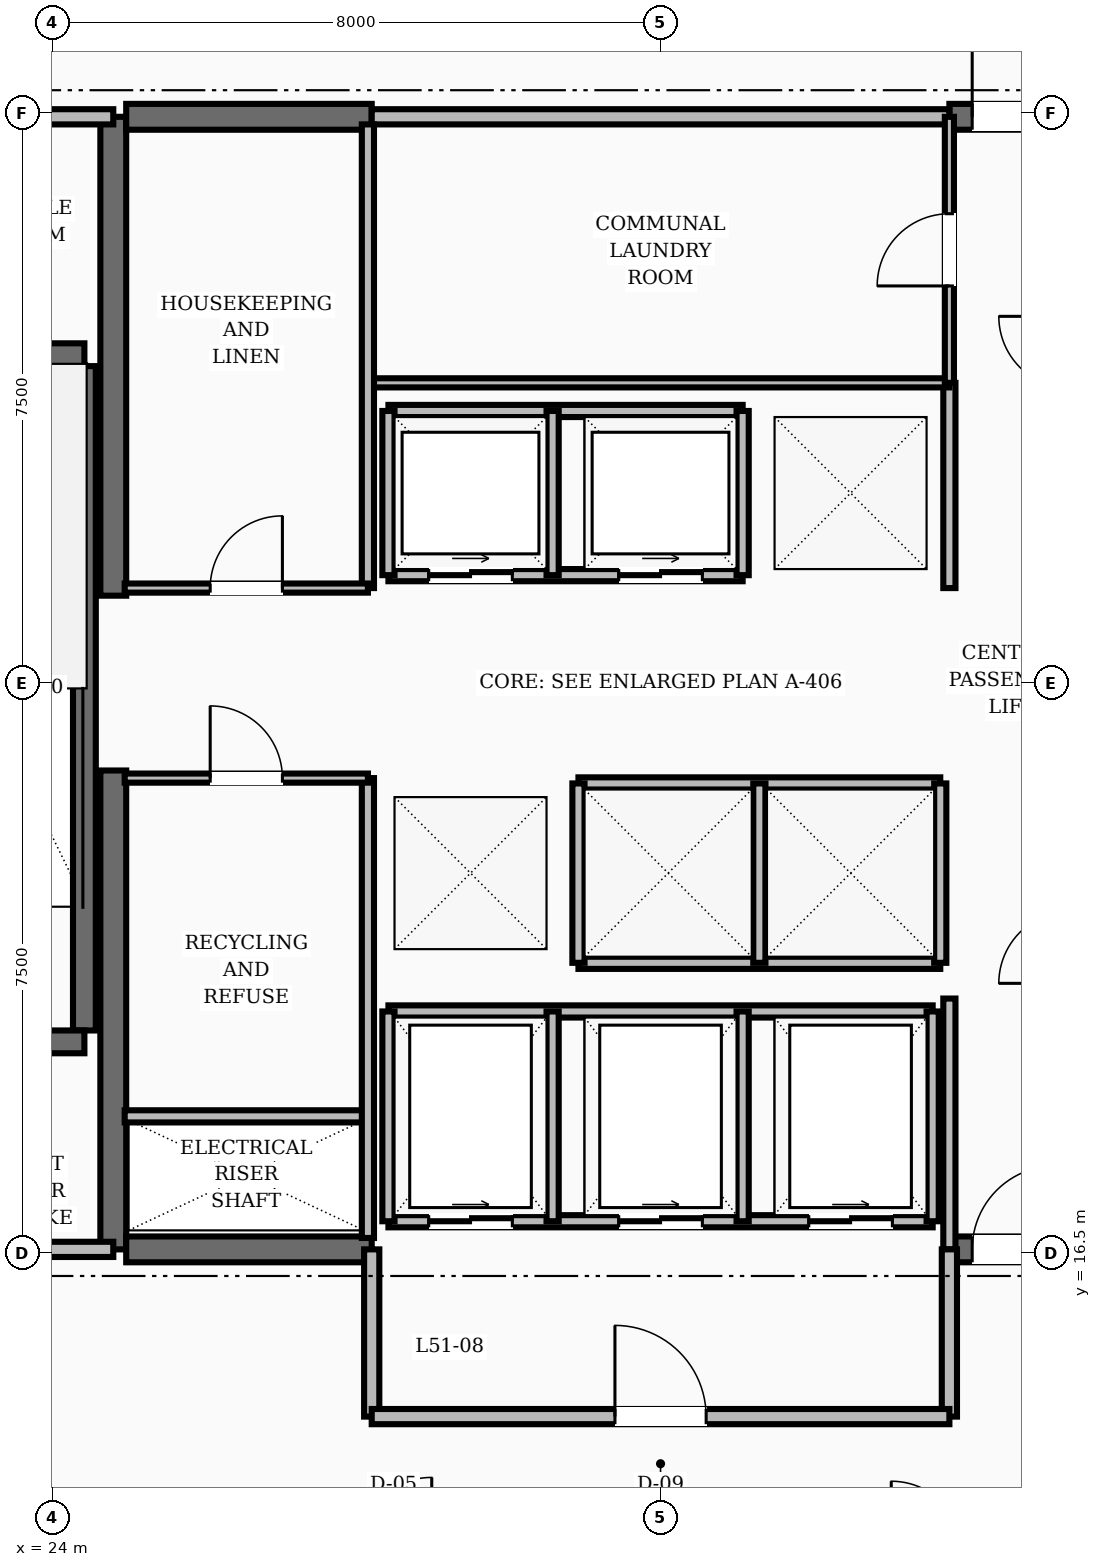
"""IFC4 building model, lengths in metres.
Left out: names, types, materials, properties, quantities, classifications, styles, units other than length and angle.
Written with IfcOpenShell. Run it as: python <this file> out.ifc"""

import sys

from ifc_helpers import new_model, si_unit, direction, frame, frame_2d, origin, place, context, subcontext, project, spatial, rectangle, extrude, element, fill, save


model = new_model("IFC4")
c1 = context("Model", 3, precision=1e-05, world=origin(), true_north=direction((0.0, 1.0)))
c2 = subcontext(c1, "Body", "Model", "MODEL_VIEW")
j1 = project(units=[si_unit("LENGTHUNIT", "METRE"), si_unit("PLANEANGLEUNIT", "RADIAN")], contexts=[c1])
p1 = place(None, origin())
s1 = spatial("IfcSite", under=j1, at=p1, CompositionType="ELEMENT")
p2 = place(p1, origin())
s2 = spatial("IfcBuilding", under=s1, at=p2, CompositionType="ELEMENT")
p3 = place(p2, frame((0.0, 0.0, 196.4)))
s3 = spatial("IfcBuildingStorey", under=s2, at=p3, CompositionType="ELEMENT", Elevation=196.4)
for number, where, z_axis, x_axis in (
    (1, (24.8, 16.55, 0.0), (0.0, 0.0, 1.0), (0.0, 1.0, 0.0)),
    (2, (24.8, 25.15, 0.0), (0.0, 0.0, 1.0), (0.0, 1.0, 0.0)),
):
    element("IfcWall", number, at=place(p3, frame(where, z_axis=z_axis, x_axis=x_axis)), inside=s3, PredefinedType="SHEAR", context=c2, shape_type="SweptSolid", body=[
        extrude(rectangle(XDim=6.3, YDim=0.34, at=frame_2d((3.15, 0.0))), origin(), (0.0, 0.0, 1.0), 3.6),
    ])
p4 = place(p3, frame((24.97, 16.55, 0.0), z_axis=(0.0, 0.0, 1.0), x_axis=(1.0, 0.0, 0.0)))
e3 = element("IfcWall", 3, at=p4, inside=s3, PredefinedType="SHEAR", context=c2, shape_type="SweptSolid", body=[
    extrude(rectangle(XDim=3.23, YDim=0.34, at=frame_2d((1.615, 0.0))), origin(), (0.0, 0.0, 1.0), 3.6),
])
p5 = place(p3, frame((35.8, 16.55, 0.0), z_axis=(0.0, 0.0, 1.0), x_axis=(1.0, 0.0, 0.0)))
e4 = element("IfcWall", 4, at=p5, inside=s3, PredefinedType="SHEAR", context=c2, shape_type="SweptSolid", body=[
    extrude(rectangle(XDim=3.23, YDim=0.34, at=frame_2d((1.615, 0.0))), origin(), (0.0, 0.0, 1.0), 3.6),
])
p6 = place(p5, frame((0.3, 0.0, 0.0)))
e5 = element("IfcOpeningElement", 5, at=p6, cuts=e4, PredefinedType="OPENING", context=c2, shape_type="SweptSolid", body=[
    extrude(rectangle(XDim=1.1, YDim=2.1, at=frame_2d((0.55, 1.05))), frame((0.0, 0.18, 0.0), z_axis=(0.0, -1.0, 0.0), x_axis=(1.0, 0.0, 0.0)), (0.0, 0.0, 1.0), 0.36),
])
p7 = place(p3, frame((24.97, 31.45, 0.0), z_axis=(0.0, 0.0, 1.0), x_axis=(1.0, 0.0, 0.0)))
e6 = element("IfcWall", 6, at=p7, inside=s3, PredefinedType="SHEAR", context=c2, shape_type="SweptSolid", body=[
    extrude(rectangle(XDim=3.23, YDim=0.34, at=frame_2d((1.615, 0.0))), origin(), (0.0, 0.0, 1.0), 3.6),
])
p8 = place(p3, frame((35.8, 31.45, 0.0), z_axis=(0.0, 0.0, 1.0), x_axis=(1.0, 0.0, 0.0)))
e7 = element("IfcWall", 7, at=p8, inside=s3, PredefinedType="SHEAR", context=c2, shape_type="SweptSolid", body=[
    extrude(rectangle(XDim=3.23, YDim=0.34, at=frame_2d((1.615, 0.0))), origin(), (0.0, 0.0, 1.0), 3.6),
])
p9 = place(p8, frame((0.3, 0.0, 0.0)))
e8 = element("IfcOpeningElement", 8, at=p9, cuts=e7, PredefinedType="OPENING", context=c2, shape_type="SweptSolid", body=[
    extrude(rectangle(XDim=1.1, YDim=2.1, at=frame_2d((0.55, 1.05))), frame((0.0, 0.18, 0.0), z_axis=(0.0, -1.0, 0.0), x_axis=(1.0, 0.0, 0.0)), (0.0, 0.0, 1.0), 0.36),
])
p10 = place(p3, frame((24.42, 19.43, 0.0), z_axis=(0.0, 0.0, 1.0), x_axis=(0.0, 1.0, 0.0)))
e9 = element("IfcWall", 9, at=p10, inside=s3, PredefinedType="SHEAR", context=c2, shape_type="SweptSolid", body=[
    extrude(rectangle(XDim=8.74, YDim=0.3, at=frame_2d((4.37, 0.0))), origin(), (0.0, 0.0, 1.0), 3.6),
])
p11 = place(p3, frame((20.82, 19.28, 0.0), z_axis=(0.0, 0.0, 1.0), x_axis=(1.0, 0.0, 0.0)))
e10 = element("IfcWall", 10, at=p11, inside=s3, PredefinedType="SHEAR", context=c2, shape_type="SweptSolid", body=[
    extrude(rectangle(XDim=3.6, YDim=0.3, at=frame_2d((1.8, 0.0))), origin(), (0.0, 0.0, 1.0), 3.6),
])
p12 = place(p11, frame((1.3, 0.0, 0.0)))
e11 = element("IfcOpeningElement", 11, at=p12, cuts=e10, PredefinedType="OPENING", context=c2, shape_type="SweptSolid", body=[
    extrude(rectangle(XDim=1.1, YDim=2.1, at=frame_2d((0.55, 1.05))), frame((0.0, 0.16, 0.0), z_axis=(0.0, -1.0, 0.0), x_axis=(1.0, 0.0, 0.0)), (0.0, 0.0, 1.0), 0.32),
])
p13 = place(p3, frame((20.82, 28.32, 0.0), z_axis=(0.0, 0.0, 1.0), x_axis=(1.0, 0.0, 0.0)))
e12 = element("IfcWall", 12, at=p13, inside=s3, PredefinedType="SHEAR", context=c2, shape_type="SweptSolid", body=[
    extrude(rectangle(XDim=3.6, YDim=0.3, at=frame_2d((1.8, 0.0))), origin(), (0.0, 0.0, 1.0), 3.6),
])
for number, where, z_axis, x_axis in (
    (13, (20.82, 16.55, 0.0), (0.0, 0.0, 1.0), (1.0, 0.0, 0.0)),
    (14, (20.82, 31.45, 0.0), (0.0, 0.0, 1.0), (1.0, 0.0, 0.0)),
):
    element("IfcWall", number, at=place(p3, frame(where, z_axis=z_axis, x_axis=x_axis)), inside=s3, PredefinedType="SOLIDWALL", context=c2, shape_type="SweptSolid", body=[
        extrude(rectangle(XDim=3.98, YDim=0.2, at=frame_2d((1.99, 0.0))), origin(), (0.0, 0.0, 1.0), 2.8),
    ])
p14 = place(p3, frame((35.8, 16.55, 0.0), z_axis=(0.0, 0.0, 1.0), x_axis=(0.0, 1.0, 0.0)))
e15 = element("IfcWall", 15, at=p14, inside=s3, PredefinedType="SOLIDWALL", context=c2, shape_type="SweptSolid", body=[
    extrude(rectangle(XDim=3.3, YDim=0.16, at=frame_2d((1.65, 0.0))), origin(), (0.0, 0.0, 1.0), 2.8),
])
p15 = place(p3, frame((35.8, 25.25, 0.0), z_axis=(0.0, 0.0, 1.0), x_axis=(0.0, 1.0, 0.0)))
e16 = element("IfcWall", 16, at=p15, inside=s3, PredefinedType="SOLIDWALL", context=c2, shape_type="SweptSolid", body=[
    extrude(rectangle(XDim=2.7, YDim=0.16, at=frame_2d((1.35, 0.0))), origin(), (0.0, 0.0, 1.0), 2.8),
])
for number, where, z_axis, x_axis in (
    (17, (28.2, 14.35, 0.0), (0.0, 0.0, 1.0), (0.0, 1.0, 0.0)),
    (18, (35.8, 14.35, 0.0), (0.0, 0.0, 1.0), (0.0, 1.0, 0.0)),
):
    element("IfcWall", number, at=place(p3, frame(where, z_axis=z_axis, x_axis=x_axis)), inside=s3, PredefinedType="SOLIDWALL", context=c2, shape_type="SweptSolid", body=[
        extrude(rectangle(XDim=2.2, YDim=0.2, at=frame_2d((1.1, 0.0))), origin(), (0.0, 0.0, 1.0), 2.8),
    ])
p16 = place(p3, frame((28.2, 14.35, 0.0), z_axis=(0.0, 0.0, 1.0), x_axis=(1.0, 0.0, 0.0)))
e19 = element("IfcWall", 19, at=p16, inside=s3, PredefinedType="SOLIDWALL", context=c2, shape_type="SweptSolid", body=[
    extrude(rectangle(XDim=7.6, YDim=0.2, at=frame_2d((3.8, 0.0))), origin(), (0.0, 0.0, 1.0), 2.8),
])
p17 = place(p16, frame((3.2, 0.0, 0.0)))
e20 = element("IfcOpeningElement", 20, at=p17, cuts=e19, PredefinedType="OPENING", context=c2, shape_type="SweptSolid", body=[
    extrude(rectangle(XDim=1.2, YDim=2.1, at=frame_2d((0.6, 1.05))), frame((0.0, 0.11, 0.0), z_axis=(0.0, -1.0, 0.0), x_axis=(1.0, 0.0, 0.0)), (0.0, 0.0, 1.0), 0.22),
])
p18 = place(p3, frame((28.42, 25.42, 0.0), z_axis=(0.0, 0.0, 1.0), x_axis=(1.0, 0.0, 0.0)))
e21 = element("IfcWall", 21, at=p18, inside=s3, PredefinedType="SOLIDWALL", context=c2, shape_type="SweptSolid", body=[
    extrude(rectangle(XDim=4.66, YDim=0.16, at=frame_2d((2.33, 0.0))), origin(), (0.0, 0.0, 1.0), 2.8),
])
p19 = place(p18, frame((0.53, 0.0, 0.0)))
e22 = element("IfcOpeningElement", 22, at=p19, cuts=e21, PredefinedType="OPENING", context=c2, shape_type="SweptSolid", body=[
    extrude(rectangle(XDim=1.1, YDim=2.15, at=frame_2d((0.55, 1.075))), frame((0.0, 0.09, 0.0), z_axis=(0.0, -1.0, 0.0), x_axis=(1.0, 0.0, 0.0)), (0.0, 0.0, 1.0), 0.18),
])
p20 = place(p18, frame((3.03, 0.0, 0.0)))
e23 = element("IfcOpeningElement", 23, at=p20, cuts=e21, PredefinedType="OPENING", context=c2, shape_type="SweptSolid", body=[
    extrude(rectangle(XDim=1.1, YDim=2.15, at=frame_2d((0.55, 1.075))), frame((0.0, 0.09, 0.0), z_axis=(0.0, -1.0, 0.0), x_axis=(1.0, 0.0, 0.0)), (0.0, 0.0, 1.0), 0.18),
])
p21 = place(p3, frame((28.42, 27.58, 0.0), z_axis=(0.0, 0.0, 1.0), x_axis=(1.0, 0.0, 0.0)))
e24 = element("IfcWall", 24, at=p21, inside=s3, PredefinedType="SOLIDWALL", context=c2, shape_type="SweptSolid", body=[
    extrude(rectangle(XDim=4.66, YDim=0.16, at=frame_2d((2.33, 0.0))), origin(), (0.0, 0.0, 1.0), 2.8),
])
for number, where, z_axis, x_axis in (
    (25, (28.42, 25.42, 0.0), (0.0, 0.0, 1.0), (0.0, 1.0, 0.0)),
    (26, (30.58, 25.42, 0.0), (0.0, 0.0, 1.0), (0.0, 1.0, 0.0)),
    (27, (33.08, 25.42, 0.0), (0.0, 0.0, 1.0), (0.0, 1.0, 0.0)),
):
    element("IfcWall", number, at=place(p3, frame(where, z_axis=z_axis, x_axis=x_axis)), inside=s3, PredefinedType="SOLIDWALL", context=c2, shape_type="SweptSolid", body=[
        extrude(rectangle(XDim=2.16, YDim=0.16, at=frame_2d((1.08, 0.0))), origin(), (0.0, 0.0, 1.0), 2.8),
    ])
for number, where, z_axis, x_axis in (
    (28, (30.92, 22.68, 0.0), (0.0, 0.0, 1.0), (1.0, 0.0, 0.0)),
    (29, (30.92, 20.32, 0.0), (0.0, 0.0, 1.0), (1.0, 0.0, 0.0)),
):
    element("IfcWall", number, at=place(p3, frame(where, z_axis=z_axis, x_axis=x_axis)), inside=s3, PredefinedType="SOLIDWALL", context=c2, shape_type="SweptSolid", body=[
        extrude(rectangle(XDim=4.76, YDim=0.16, at=frame_2d((2.38, 0.0))), origin(), (0.0, 0.0, 1.0), 2.8),
    ])
for number, where, z_axis, x_axis in (
    (30, (30.92, 20.32, 0.0), (0.0, 0.0, 1.0), (0.0, 1.0, 0.0)),
    (31, (33.3, 20.32, 0.0), (0.0, 0.0, 1.0), (0.0, 1.0, 0.0)),
    (32, (35.68, 20.32, 0.0), (0.0, 0.0, 1.0), (0.0, 1.0, 0.0)),
):
    element("IfcWall", number, at=place(p3, frame(where, z_axis=z_axis, x_axis=x_axis)), inside=s3, PredefinedType="SOLIDWALL", context=c2, shape_type="SweptSolid", body=[
        extrude(rectangle(XDim=2.36, YDim=0.16, at=frame_2d((1.18, 0.0))), origin(), (0.0, 0.0, 1.0), 2.8),
    ])
p22 = place(p3, frame((28.42, 16.92, 0.0), z_axis=(0.0, 0.0, 1.0), x_axis=(1.0, 0.0, 0.0)))
e33 = element("IfcWall", 33, at=p22, inside=s3, PredefinedType="SOLIDWALL", context=c2, shape_type="SweptSolid", body=[
    extrude(rectangle(XDim=7.16, YDim=0.16, at=frame_2d((3.58, 0.0))), origin(), (0.0, 0.0, 1.0), 2.8),
])
p23 = place(p22, frame((0.53, 0.0, 0.0)))
e34 = element("IfcOpeningElement", 34, at=p23, cuts=e33, PredefinedType="OPENING", context=c2, shape_type="SweptSolid", body=[
    extrude(rectangle(XDim=1.1, YDim=2.15, at=frame_2d((0.55, 1.075))), frame((0.0, 0.09, 0.0), z_axis=(0.0, -1.0, 0.0), x_axis=(1.0, 0.0, 0.0)), (0.0, 0.0, 1.0), 0.18),
])
p24 = place(p22, frame((3.03, 0.0, 0.0)))
e35 = element("IfcOpeningElement", 35, at=p24, cuts=e33, PredefinedType="OPENING", context=c2, shape_type="SweptSolid", body=[
    extrude(rectangle(XDim=1.1, YDim=2.15, at=frame_2d((0.55, 1.075))), frame((0.0, 0.09, 0.0), z_axis=(0.0, -1.0, 0.0), x_axis=(1.0, 0.0, 0.0)), (0.0, 0.0, 1.0), 0.18),
])
p25 = place(p22, frame((5.53, 0.0, 0.0)))
e36 = element("IfcOpeningElement", 36, at=p25, cuts=e33, PredefinedType="OPENING", context=c2, shape_type="SweptSolid", body=[
    extrude(rectangle(XDim=1.1, YDim=2.15, at=frame_2d((0.55, 1.075))), frame((0.0, 0.09, 0.0), z_axis=(0.0, -1.0, 0.0), x_axis=(1.0, 0.0, 0.0)), (0.0, 0.0, 1.0), 0.18),
])
p26 = place(p3, frame((28.42, 19.68, 0.0), z_axis=(0.0, 0.0, 1.0), x_axis=(1.0, 0.0, 0.0)))
e37 = element("IfcWall", 37, at=p26, inside=s3, PredefinedType="SOLIDWALL", context=c2, shape_type="SweptSolid", body=[
    extrude(rectangle(XDim=7.16, YDim=0.16, at=frame_2d((3.58, 0.0))), origin(), (0.0, 0.0, 1.0), 2.8),
])
for number, where, z_axis, x_axis in (
    (38, (28.42, 16.92, 0.0), (0.0, 0.0, 1.0), (0.0, 1.0, 0.0)),
    (39, (30.58, 16.92, 0.0), (0.0, 0.0, 1.0), (0.0, 1.0, 0.0)),
    (40, (33.08, 16.92, 0.0), (0.0, 0.0, 1.0), (0.0, 1.0, 0.0)),
    (41, (35.58, 16.92, 0.0), (0.0, 0.0, 1.0), (0.0, 1.0, 0.0)),
):
    element("IfcWall", number, at=place(p3, frame(where, z_axis=z_axis, x_axis=x_axis)), inside=s3, PredefinedType="SOLIDWALL", context=c2, shape_type="SweptSolid", body=[
        extrude(rectangle(XDim=2.76, YDim=0.16, at=frame_2d((1.38, 0.0))), origin(), (0.0, 0.0, 1.0), 2.8),
    ])
p27 = place(p3, frame((28.2, 31.45, 0.0), z_axis=(0.0, 0.0, 1.0), x_axis=(1.0, 0.0, 0.0)))
e42 = element("IfcWall", 42, at=p27, inside=s3, PredefinedType="SOLIDWALL", context=c2, shape_type="SweptSolid", body=[
    extrude(rectangle(XDim=7.6, YDim=0.2, at=frame_2d((3.8, 0.0))), origin(), (0.0, 0.0, 1.0), 2.8),
])
p28 = place(p3, frame((28.2, 27.95, 0.0), z_axis=(0.0, 0.0, 1.0), x_axis=(1.0, 0.0, 0.0)))
e43 = element("IfcWall", 43, at=p28, inside=s3, PredefinedType="PARTITIONING", context=c2, shape_type="SweptSolid", body=[
    extrude(rectangle(XDim=7.6, YDim=0.12, at=frame_2d((3.8, 0.0))), origin(), (0.0, 0.0, 1.0), 2.8),
])
p29 = place(p3, frame((35.8, 27.95, 0.0), z_axis=(0.0, 0.0, 1.0), x_axis=(0.0, 1.0, 0.0)))
e44 = element("IfcWall", 44, at=p29, inside=s3, PredefinedType="PARTITIONING", context=c2, shape_type="SweptSolid", body=[
    extrude(rectangle(XDim=3.5, YDim=0.12, at=frame_2d((1.75, 0.0))), origin(), (0.0, 0.0, 1.0), 2.8),
])
p30 = place(p29, frame((1.275, 0.0, 0.0)))
e45 = element("IfcOpeningElement", 45, at=p30, cuts=e44, PredefinedType="OPENING", context=c2, shape_type="SweptSolid", body=[
    extrude(rectangle(XDim=0.95, YDim=2.1, at=frame_2d((0.475, 1.05))), frame((0.0, 0.07, 0.0), z_axis=(0.0, -1.0, 0.0), x_axis=(1.0, 0.0, 0.0)), (0.0, 0.0, 1.0), 0.14),
])
p31 = place(p3, frame((24.95, 18.3, 0.0), z_axis=(0.0, 0.0, 1.0), x_axis=(1.0, 0.0, 0.0)))
e46 = element("IfcWall", 46, at=p31, inside=s3, PredefinedType="SOLIDWALL", context=c2, shape_type="SweptSolid", body=[
    extrude(rectangle(XDim=3.2, YDim=0.16, at=frame_2d((1.6, 0.0))), origin(), (0.0, 0.0, 1.0), 2.8),
])
p32 = place(p3, frame((28.15, 16.7, 0.0), z_axis=(0.0, 0.0, 1.0), x_axis=(0.0, 1.0, 0.0)))
e47 = element("IfcWall", 47, at=p32, inside=s3, PredefinedType="SOLIDWALL", context=c2, shape_type="SweptSolid", body=[
    extrude(rectangle(XDim=6.05, YDim=0.16, at=frame_2d((3.025, 0.0))), origin(), (0.0, 0.0, 1.0), 2.8),
])
p33 = place(p3, frame((28.15, 25.25, 0.0), z_axis=(0.0, 0.0, 1.0), x_axis=(0.0, 1.0, 0.0)))
e48 = element("IfcWall", 48, at=p33, inside=s3, PredefinedType="SOLIDWALL", context=c2, shape_type="SweptSolid", body=[
    extrude(rectangle(XDim=6.1, YDim=0.16, at=frame_2d((3.05, 0.0))), origin(), (0.0, 0.0, 1.0), 2.8),
])
p34 = place(p3, frame((24.95, 25.25, 0.0), z_axis=(0.0, 0.0, 1.0), x_axis=(1.0, 0.0, 0.0)))
e49 = element("IfcWall", 49, at=p34, inside=s3, PredefinedType="PARTITIONING", context=c2, shape_type="SweptSolid", body=[
    extrude(rectangle(XDim=3.2, YDim=0.12, at=frame_2d((1.6, 0.0))), origin(), (0.0, 0.0, 1.0), 2.8),
])
p35 = place(p34, frame((1.125, 0.0, 0.0)))
e50 = element("IfcOpeningElement", 50, at=p35, cuts=e49, PredefinedType="OPENING", context=c2, shape_type="SweptSolid", body=[
    extrude(rectangle(XDim=0.95, YDim=2.1, at=frame_2d((0.475, 1.05))), frame((0.0, 0.07, 0.0), z_axis=(0.0, -1.0, 0.0), x_axis=(1.0, 0.0, 0.0)), (0.0, 0.0, 1.0), 0.14),
])
p36 = place(p3, frame((24.95, 22.75, 0.0), z_axis=(0.0, 0.0, 1.0), x_axis=(1.0, 0.0, 0.0)))
e51 = element("IfcWall", 51, at=p36, inside=s3, PredefinedType="PARTITIONING", context=c2, shape_type="SweptSolid", body=[
    extrude(rectangle(XDim=3.2, YDim=0.12, at=frame_2d((1.6, 0.0))), origin(), (0.0, 0.0, 1.0), 2.8),
])
p37 = place(p36, frame((1.125, 0.0, 0.0)))
e52 = element("IfcOpeningElement", 52, at=p37, cuts=e51, PredefinedType="OPENING", context=c2, shape_type="SweptSolid", body=[
    extrude(rectangle(XDim=0.95, YDim=2.1, at=frame_2d((0.475, 1.05))), frame((0.0, 0.07, 0.0), z_axis=(0.0, -1.0, 0.0), x_axis=(1.0, 0.0, 0.0)), (0.0, 0.0, 1.0), 0.14),
])
p38 = place(p9, origin())
e53 = element("IfcDoor", 53, at=p38, inside=s3, OperationType="SINGLE_SWING_LEFT", PredefinedType="DOOR", context=c2, shape_type="SweptSolid", body=[
    extrude(rectangle(XDim=1.1, YDim=2.1, at=frame_2d((0.55, 1.05))), frame((0.0, 0.025, 0.0), z_axis=(0.0, -1.0, 0.0), x_axis=(1.0, 0.0, 0.0)), (0.0, 0.0, 1.0), 0.05),
])
fill(e8, e53)
p39 = place(p6, origin())
e54 = element("IfcDoor", 54, at=p39, inside=s3, OperationType="SINGLE_SWING_RIGHT", PredefinedType="DOOR", context=c2, shape_type="SweptSolid", body=[
    extrude(rectangle(XDim=1.1, YDim=2.1, at=frame_2d((0.55, 1.05))), frame((0.0, 0.025, 0.0), z_axis=(0.0, -1.0, 0.0), x_axis=(1.0, 0.0, 0.0)), (0.0, 0.0, 1.0), 0.05),
])
fill(e5, e54)
p40 = place(p17, origin())
e55 = element("IfcDoor", 55, at=p40, inside=s3, OperationType="SINGLE_SWING_LEFT", PredefinedType="DOOR", context=c2, shape_type="SweptSolid", body=[
    extrude(rectangle(XDim=1.2, YDim=2.1, at=frame_2d((0.6, 1.05))), frame((0.0, 0.025, 0.0), z_axis=(0.0, -1.0, 0.0), x_axis=(1.0, 0.0, 0.0)), (0.0, 0.0, 1.0), 0.05),
])
fill(e20, e55)
p41 = place(p19, origin())
e56 = element("IfcDoor", 56, at=p41, inside=s3, OperationType="SLIDING_TO_RIGHT", PredefinedType="DOOR", context=c2, shape_type="SweptSolid", body=[
    extrude(rectangle(XDim=1.1, YDim=2.15, at=frame_2d((0.55, 1.075))), frame((0.0, 0.025, 0.0), z_axis=(0.0, -1.0, 0.0), x_axis=(1.0, 0.0, 0.0)), (0.0, 0.0, 1.0), 0.05),
])
fill(e22, e56)
p42 = place(p20, origin())
e57 = element("IfcDoor", 57, at=p42, inside=s3, OperationType="SLIDING_TO_RIGHT", PredefinedType="DOOR", context=c2, shape_type="SweptSolid", body=[
    extrude(rectangle(XDim=1.1, YDim=2.15, at=frame_2d((0.55, 1.075))), frame((0.0, 0.025, 0.0), z_axis=(0.0, -1.0, 0.0), x_axis=(1.0, 0.0, 0.0)), (0.0, 0.0, 1.0), 0.05),
])
fill(e23, e57)
p43 = place(p23, origin())
e58 = element("IfcDoor", 58, at=p43, inside=s3, OperationType="SLIDING_TO_RIGHT", PredefinedType="DOOR", context=c2, shape_type="SweptSolid", body=[
    extrude(rectangle(XDim=1.1, YDim=2.15, at=frame_2d((0.55, 1.075))), frame((0.0, 0.025, 0.0), z_axis=(0.0, -1.0, 0.0), x_axis=(1.0, 0.0, 0.0)), (0.0, 0.0, 1.0), 0.05),
])
fill(e34, e58)
p44 = place(p24, origin())
e59 = element("IfcDoor", 59, at=p44, inside=s3, OperationType="SLIDING_TO_RIGHT", PredefinedType="DOOR", context=c2, shape_type="SweptSolid", body=[
    extrude(rectangle(XDim=1.1, YDim=2.15, at=frame_2d((0.55, 1.075))), frame((0.0, 0.025, 0.0), z_axis=(0.0, -1.0, 0.0), x_axis=(1.0, 0.0, 0.0)), (0.0, 0.0, 1.0), 0.05),
])
fill(e35, e59)
p45 = place(p25, origin())
e60 = element("IfcDoor", 60, at=p45, inside=s3, OperationType="SLIDING_TO_RIGHT", PredefinedType="DOOR", context=c2, shape_type="SweptSolid", body=[
    extrude(rectangle(XDim=1.1, YDim=2.15, at=frame_2d((0.55, 1.075))), frame((0.0, 0.025, 0.0), z_axis=(0.0, -1.0, 0.0), x_axis=(1.0, 0.0, 0.0)), (0.0, 0.0, 1.0), 0.05),
])
fill(e36, e60)
p46 = place(p30, origin())
e61 = element("IfcDoor", 61, at=p46, inside=s3, OperationType="SINGLE_SWING_LEFT", PredefinedType="DOOR", context=c2, shape_type="SweptSolid", body=[
    extrude(rectangle(XDim=0.95, YDim=2.1, at=frame_2d((0.475, 1.05))), frame((0.0, 0.025, 0.0), z_axis=(0.0, -1.0, 0.0), x_axis=(1.0, 0.0, 0.0)), (0.0, 0.0, 1.0), 0.05),
])
fill(e45, e61)
p47 = place(p35, origin())
e62 = element("IfcDoor", 62, at=p47, inside=s3, OperationType="SINGLE_SWING_RIGHT", PredefinedType="DOOR", context=c2, shape_type="SweptSolid", body=[
    extrude(rectangle(XDim=0.95, YDim=2.1, at=frame_2d((0.475, 1.05))), frame((0.0, 0.025, 0.0), z_axis=(0.0, -1.0, 0.0), x_axis=(1.0, 0.0, 0.0)), (0.0, 0.0, 1.0), 0.05),
])
fill(e50, e62)
p48 = place(p37, origin())
e63 = element("IfcDoor", 63, at=p48, inside=s3, OperationType="SINGLE_SWING_LEFT", PredefinedType="DOOR", context=c2, shape_type="SweptSolid", body=[
    extrude(rectangle(XDim=0.95, YDim=2.1, at=frame_2d((0.475, 1.05))), frame((0.0, 0.025, 0.0), z_axis=(0.0, -1.0, 0.0), x_axis=(1.0, 0.0, 0.0)), (0.0, 0.0, 1.0), 0.05),
])
fill(e52, e63)
save(model, sys.argv[1])
